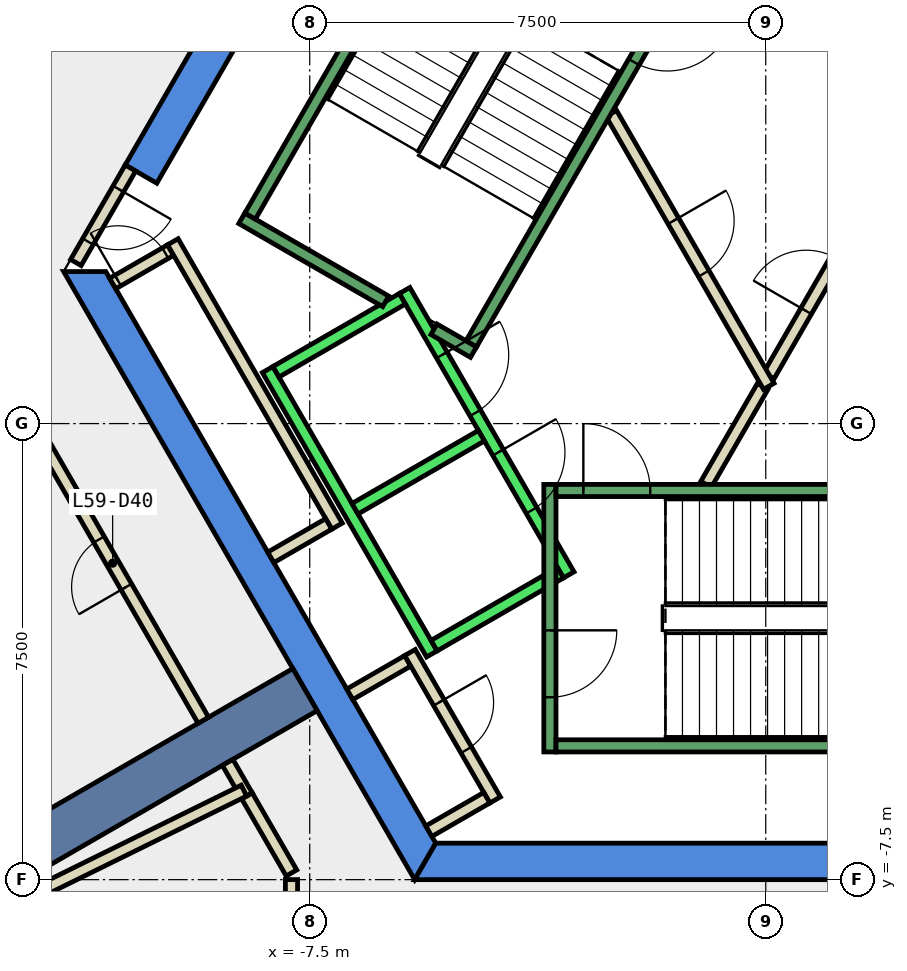
"""IFC4 building model, lengths in metres.
Left out: names, types, materials, properties, quantities, classifications, styles, units other than length and angle.
Written with IfcOpenShell. Run it as: python <this file> out.ifc"""

import sys

from ifc_helpers import new_model, si_unit, direction, frame, frame_2d, origin, place, context, subcontext, project, spatial, polyline, rectangle, outline, extrude, element, fill, save


model = new_model("IFC4")
c1 = context("Model", 3, precision=1e-05, world=origin(), true_north=direction((0.0, 1.0)))
c2 = subcontext(c1, "Body", "Model", "MODEL_VIEW")
j1 = project(units=[si_unit("LENGTHUNIT", "METRE"), si_unit("PLANEANGLEUNIT", "RADIAN")], contexts=[c1])
p1 = place(None, origin())
s1 = spatial("IfcSite", under=j1, at=p1, CompositionType="ELEMENT")
p2 = place(p1, origin())
s2 = spatial("IfcBuilding", under=s1, at=p2, CompositionType="ELEMENT")
p3 = place(p2, frame((0.0, 0.0, 259.4)))
s3 = spatial("IfcBuildingStorey", under=s2, at=p3, CompositionType="ELEMENT", Elevation=259.4)
p4 = place(p3, frame((0.0, 0.0, -0.34)))
e1 = element("IfcWall", 1, at=p4, inside=s3, PredefinedType="SHEAR", context=c2, shape_type="SweptSolid", body=[
    extrude(outline(polyline([(-10.535, 4.253), (-10.015, 3.953), (-5.427, 11.9), (-5.774, 12.5), (-10.535, 4.253)])), origin(), (0.0, 0.0, 1.0), 3.6),
])
p5 = place(p3, frame((0.0, 0.0, -0.34)))
e2 = element("IfcWall", 2, at=p5, inside=s3, PredefinedType="SHEAR", context=c2, shape_type="SweptSolid", body=[
    extrude(outline(polyline([(-11.547, 2.5), (-5.774, -7.5), (-5.427, -6.9), (-10.854, 2.5), (-11.547, 2.5)])), origin(), (0.0, 0.0, 1.0), 3.6),
])
p6 = place(p3, frame((0.0, 0.0, -0.34)))
e3 = element("IfcWall", 3, at=p6, inside=s3, PredefinedType="SHEAR", context=c2, shape_type="SweptSolid", body=[
    extrude(outline(polyline([(3.75, -7.5), (3.75, -6.9), (-5.427, -6.9), (-5.774, -7.5), (3.75, -7.5)])), origin(), (0.0, 0.0, 1.0), 3.6),
])
p7 = place(p3, frame((-7.578, -4.375, -0.34), z_axis=(0.0, 0.0, 1.0), x_axis=(-0.866024315419, -0.5000018851, 0.0)))
e4 = element("IfcWall", 4, at=p7, inside=s3, PredefinedType="SHEAR", context=c2, shape_type="SweptSolid", body=[
    extrude(rectangle(XDim=9.0, YDim=0.8, at=frame_2d((4.5, 0.0))), origin(), (0.0, 0.0, 1.0), 3.6),
])
p8 = place(p3, frame((-8.532, -6.123, 0.0), z_axis=(0.0, 0.0, 1.0), x_axis=(-0.499977104415, 0.866038622153, 0.0)))
e5 = element("IfcWall", 5, at=p8, inside=s3, PredefinedType="PARTITIONING", context=c2, shape_type="SweptSolid", body=[
    extrude(rectangle(XDim=0.636, YDim=0.2, at=frame_2d((0.318, 0.0))), origin(), (0.0, 0.0, 1.0), 3.26),
])
p9 = place(p3, frame((-7.8, -7.39, 0.0), z_axis=(0.0, 0.0, 1.0), x_axis=(-0.500266477503, 0.865871498253, 0.0)))
e6 = element("IfcWall", 6, at=p9, inside=s3, PredefinedType="PARTITIONING", context=c2, shape_type="SweptSolid", body=[
    extrude(rectangle(XDim=1.463, YDim=0.2, at=frame_2d((0.731, 0.0))), origin(), (0.0, 0.0, 1.0), 3.26),
])
p10 = place(p3, frame((-13.652, 4.224, 0.0), z_axis=(0.0, 0.0, 1.0), x_axis=(0.500221427001, 0.865897525097, 0.0)))
e7 = element("IfcWall", 7, at=p10, inside=s3, PredefinedType="PARTITIONING", context=c2, shape_type="SweptSolid", body=[
    extrude(rectangle(XDim=3.91, YDim=0.2, at=frame_2d((1.955, 0.0))), origin(), (0.0, 0.0, 1.0), 3.26),
])
p11 = place(p10, frame((1.505, 0.0, 0.0)))
e8 = element("IfcOpeningElement", 8, at=p11, cuts=e7, PredefinedType="OPENING", context=c2, shape_type="SweptSolid", body=[
    extrude(rectangle(XDim=1.0, YDim=2.1, at=frame_2d((0.5, 1.05))), frame((0.0, 0.11, 0.0), z_axis=(0.0, -1.0, 0.0), x_axis=(1.0, 0.0, 0.0)), (0.0, 0.0, 1.0), 0.22),
])
p12 = place(p3, frame((-10.741, 2.303, 0.0), z_axis=(0.0, 0.0, 1.0), x_axis=(0.866063652425, 0.499933745558, 0.0)))
e9 = element("IfcWall", 9, at=p12, inside=s3, PredefinedType="PARTITIONING", context=c2, shape_type="SweptSolid", body=[
    extrude(rectangle(XDim=1.1, YDim=0.2, at=frame_2d((0.55, 0.0))), origin(), (0.0, 0.0, 1.0), 3.26),
])
p13 = place(p12, frame((0.1, 0.0, 0.0)))
e10 = element("IfcOpeningElement", 10, at=p13, cuts=e9, PredefinedType="OPENING", context=c2, shape_type="SweptSolid", body=[
    extrude(rectangle(XDim=0.9, YDim=2.1, at=frame_2d((0.45, 1.05))), frame((0.0, 0.11, 0.0), z_axis=(0.0, -1.0, 0.0), x_axis=(1.0, 0.0, 0.0)), (0.0, 0.0, 1.0), 0.22),
])
p14 = place(p3, frame((-9.751, 2.99, 0.0), z_axis=(0.0, 0.0, 1.0), x_axis=(0.499955951776, -0.866050833545, 0.0)))
e11 = element("IfcWall", 11, at=p14, inside=s3, PredefinedType="PARTITIONING", context=c2, shape_type="SweptSolid", body=[
    extrude(rectangle(XDim=5.4, YDim=0.2, at=frame_2d((2.7, 0.0))), origin(), (0.0, 0.0, 1.0), 3.26),
])
p15 = place(p3, frame((-7.188, -1.65, 0.0), z_axis=(0.0, 0.0, 1.0), x_axis=(-0.865841558281, -0.500318294642, 0.0)))
e12 = element("IfcWall", 12, at=p15, inside=s3, PredefinedType="PARTITIONING", context=c2, shape_type="SweptSolid", body=[
    extrude(rectangle(XDim=1.099, YDim=0.2, at=frame_2d((0.55, 0.0))), origin(), (0.0, 0.0, 1.0), 3.26),
])
p16 = place(p3, frame((-6.841, -4.452, 0.0), z_axis=(0.0, 0.0, 1.0), x_axis=(0.86621513555, 0.499671230855, 0.0)))
e13 = element("IfcWall", 13, at=p16, inside=s3, PredefinedType="PARTITIONING", context=c2, shape_type="SweptSolid", body=[
    extrude(rectangle(XDim=1.1, YDim=0.2, at=frame_2d((0.55, 0.0))), origin(), (0.0, 0.0, 1.0), 3.26),
])
p17 = place(p3, frame((-5.851, -3.765, 0.0), z_axis=(0.0, 0.0, 1.0), x_axis=(0.500011755427, -0.866018616679, 0.0)))
e14 = element("IfcWall", 14, at=p17, inside=s3, PredefinedType="PARTITIONING", context=c2, shape_type="SweptSolid", body=[
    extrude(rectangle(XDim=2.8, YDim=0.2, at=frame_2d((1.4, 0.0))), origin(), (0.0, 0.0, 1.0), 3.26),
])
p18 = place(p17, frame((0.95, 0.0, 0.0)))
e15 = element("IfcOpeningElement", 15, at=p18, cuts=e14, PredefinedType="OPENING", context=c2, shape_type="SweptSolid", body=[
    extrude(rectangle(XDim=0.9, YDim=2.1, at=frame_2d((0.45, 1.05))), frame((0.0, 0.11, 0.0), z_axis=(0.0, -1.0, 0.0), x_axis=(1.0, 0.0, 0.0)), (0.0, 0.0, 1.0), 0.22),
])
p19 = place(p3, frame((-4.588, -6.153, 0.0), z_axis=(0.0, 0.0, 1.0), x_axis=(-0.86621513555, -0.499671230855, 0.0)))
e16 = element("IfcWall", 16, at=p19, inside=s3, PredefinedType="PARTITIONING", context=c2, shape_type="SweptSolid", body=[
    extrude(rectangle(XDim=1.1, YDim=0.2, at=frame_2d((0.55, 0.0))), origin(), (0.0, 0.0, 1.0), 3.26),
])
p20 = place(p3, frame((-0.982, -1.0, 0.0), z_axis=(0.0, 0.0, 1.0), x_axis=(0.50024047865, 0.865886518847, 0.0)))
e17 = element("IfcWall", 17, at=p20, inside=s3, PredefinedType="PARTITIONING", context=c2, shape_type="SweptSolid", body=[
    extrude(rectangle(XDim=1.863, YDim=0.2, at=frame_2d((0.931, 0.0))), origin(), (0.0, 0.0, 1.0), 3.26),
])
p21 = place(p3, frame((0.05, 0.787, 0.0), z_axis=(0.0, 0.0, 1.0), x_axis=(0.499954076797, 0.866051915934, 0.0)))
e18 = element("IfcWall", 18, at=p21, inside=s3, PredefinedType="PARTITIONING", context=c2, shape_type="SweptSolid", body=[
    extrude(rectangle(XDim=3.558, YDim=0.2, at=frame_2d((1.779, 0.0))), origin(), (0.0, 0.0, 1.0), 3.26),
])
p22 = place(p21, frame((1.229, 0.0, 0.0)))
e19 = element("IfcOpeningElement", 19, at=p22, cuts=e18, PredefinedType="OPENING", context=c2, shape_type="SweptSolid", body=[
    extrude(rectangle(XDim=1.0, YDim=2.1, at=frame_2d((0.5, 1.05))), frame((0.0, 0.11, 0.0), z_axis=(0.0, -1.0, 0.0), x_axis=(1.0, 0.0, 0.0)), (0.0, 0.0, 1.0), 0.22),
])
p23 = place(p3, frame((-2.54, 5.1, 0.0), z_axis=(0.0, 0.0, 1.0), x_axis=(0.499925051871, -0.866068670783, 0.0)))
e20 = element("IfcWall", 20, at=p23, inside=s3, PredefinedType="PARTITIONING", context=c2, shape_type="SweptSolid", body=[
    extrude(rectangle(XDim=5.181, YDim=0.2, at=frame_2d((2.59, 0.0))), origin(), (0.0, 0.0, 1.0), 3.26),
])
p24 = place(p23, frame((2.04, 0.0, 0.0)))
e21 = element("IfcOpeningElement", 21, at=p24, cuts=e20, PredefinedType="OPENING", context=c2, shape_type="SweptSolid", body=[
    extrude(rectangle(XDim=1.0, YDim=2.1, at=frame_2d((0.5, 1.05))), frame((0.0, 0.11, 0.0), z_axis=(0.0, -1.0, 0.0), x_axis=(1.0, 0.0, 0.0)), (0.0, 0.0, 1.0), 0.22),
])
p25 = place(p3, frame((-7.8, -12.184, 0.0), z_axis=(0.0, 0.0, 1.0), x_axis=(0.0, 1.0, 0.0)))
e22 = element("IfcWall", 22, at=p25, inside=s3, PredefinedType="PARTITIONING", context=c2, shape_type="SweptSolid", body=[
    extrude(rectangle(XDim=4.685, YDim=0.2, at=frame_2d((2.343, 0.0))), origin(), (0.0, 0.0, 1.0), 3.26),
])
p26 = place(p3, frame((-8.582, -6.036, 0.0), z_axis=(0.0, 0.0, 1.0), x_axis=(-0.897105141673, -0.441817116897, 0.0)))
e23 = element("IfcWall", 23, at=p26, inside=s3, PredefinedType="PARTITIONING", context=c2, shape_type="SweptSolid", body=[
    extrude(rectangle(XDim=5.111, YDim=0.2, at=frame_2d((2.555, 0.0))), origin(), (0.0, 0.0, 1.0), 3.26),
])
p27 = place(p3, frame((-10.449, 4.203, 0.0), z_axis=(0.0, 0.0, 1.0), x_axis=(-0.499914839587, -0.866074565589, 0.0)))
e24 = element("IfcWall", 24, at=p27, inside=s3, PredefinedType="PARTITIONING", context=c2, shape_type="SweptSolid", body=[
    extrude(rectangle(XDim=1.794, YDim=0.2, at=frame_2d((0.897, 0.0))), origin(), (0.0, 0.0, 1.0), 2.4),
])
p28 = place(p27, frame((0.397, 0.0, 0.0)))
e25 = element("IfcOpeningElement", 25, at=p28, cuts=e24, PredefinedType="OPENING", context=c2, shape_type="SweptSolid", body=[
    extrude(rectangle(XDim=1.0, YDim=2.1, at=frame_2d((0.5, 1.05))), frame((0.0, 0.11, 0.0), z_axis=(0.0, -1.0, 0.0), x_axis=(1.0, 0.0, 0.0)), (0.0, 0.0, 1.0), 0.22),
])
p29 = place(p3, frame((-9.25, -4.879, 0.0), z_axis=(0.0, 0.0, 1.0), x_axis=(-0.499944124422, 0.866057661161, 0.0)))
e26 = element("IfcWall", 26, at=p29, inside=s3, PredefinedType="PARTITIONING", context=c2, shape_type="SweptSolid", body=[
    extrude(rectangle(XDim=7.405, YDim=0.2, at=frame_2d((3.702, 0.0))), origin(), (0.0, 0.0, 1.0), 3.26),
])
p30 = place(p29, frame((2.533, 0.0, 0.0)))
e27 = element("IfcOpeningElement", 27, at=p30, cuts=e26, PredefinedType="OPENING", context=c2, shape_type="SweptSolid", body=[
    extrude(rectangle(XDim=0.9, YDim=2.1, at=frame_2d((0.45, 1.05))), frame((0.0, 0.11, 0.0), z_axis=(0.0, -1.0, 0.0), x_axis=(1.0, 0.0, 0.0)), (0.0, 0.0, 1.0), 0.22),
])
p31 = place(p3, frame((-5.94, 2.188, 0.0), z_axis=(0.0, 0.0, 1.0), x_axis=(0.500034260056, -0.866005622828, 0.0)))
e28 = element("IfcWall", 28, at=p31, inside=s3, PredefinedType="STANDARD", context=c2, shape_type="SweptSolid", body=[
    extrude(rectangle(XDim=5.399, YDim=0.2, at=frame_2d((2.7, 0.0))), origin(), (0.0, 0.0, 1.0), 3.26),
])
p32 = place(p31, frame((3.075, 0.0, 0.0)))
e29 = element("IfcOpeningElement", 29, at=p32, cuts=e28, PredefinedType="OPENING", context=c2, shape_type="SweptSolid", body=[
    extrude(rectangle(XDim=1.1, YDim=2.1, at=frame_2d((0.55, 1.05))), frame((0.0, 0.11, 0.0), z_axis=(0.0, -1.0, 0.0), x_axis=(1.0, 0.0, 0.0)), (0.0, 0.0, 1.0), 0.22),
])
p33 = place(p31, frame((1.225, 0.0, 0.0)))
e30 = element("IfcOpeningElement", 30, at=p33, cuts=e28, PredefinedType="OPENING", context=c2, shape_type="SweptSolid", body=[
    extrude(rectangle(XDim=1.1, YDim=2.1, at=frame_2d((0.55, 1.05))), frame((0.0, 0.11, 0.0), z_axis=(0.0, -1.0, 0.0), x_axis=(1.0, 0.0, 0.0)), (0.0, 0.0, 1.0), 0.22),
])
p34 = place(p3, frame((-8.192, 0.888, 0.0), z_axis=(0.0, 0.0, 1.0), x_axis=(0.500034260056, -0.866005622828, 0.0)))
e31 = element("IfcWall", 31, at=p34, inside=s3, PredefinedType="STANDARD", context=c2, shape_type="SweptSolid", body=[
    extrude(rectangle(XDim=5.399, YDim=0.2, at=frame_2d((2.7, 0.0))), origin(), (0.0, 0.0, 1.0), 3.26),
])
for number, where, z_axis, x_axis in (
    (32, (-5.977, 2.052, 0.0), (0.0, 0.0, 1.0), (-0.866, -0.5, 0.0)),
    (33, (-4.677, -0.2, 0.0), (0.0, 0.0, 1.0), (-0.866, -0.5, 0.0)),
):
    element("IfcWall", number, at=place(p3, frame(where, z_axis=z_axis, x_axis=x_axis)), inside=s3, PredefinedType="STANDARD", context=c2, shape_type="SweptSolid", body=[
        extrude(rectangle(XDim=2.399, YDim=0.2, at=frame_2d((1.2, 0.0))), origin(), (0.0, 0.0, 1.0), 3.26),
    ])
p35 = place(p3, frame((-3.377, -2.452, 0.0), z_axis=(0.0, 0.0, 1.0), x_axis=(-0.865955154139, -0.50012165622, 0.0)))
e34 = element("IfcWall", 34, at=p35, inside=s3, PredefinedType="STANDARD", context=c2, shape_type="SweptSolid", body=[
    extrude(rectangle(XDim=2.4, YDim=0.2, at=frame_2d((1.2, 0.0))), origin(), (0.0, 0.0, 1.0), 3.26),
])
p36 = place(p3, frame((-3.55, -1.0, 0.0), z_axis=(0.0, 0.0, 1.0), x_axis=(0.0, -1.0, 0.0)))
e35 = element("IfcWall", 35, at=p36, inside=s3, PredefinedType="STANDARD", context=c2, shape_type="SweptSolid", body=[
    extrude(rectangle(XDim=4.4, YDim=0.2, at=frame_2d((2.2, 0.0))), origin(), (0.0, 0.0, 1.0), 3.26),
])
p37 = place(p36, frame((2.4, 0.0, 0.0)))
e36 = element("IfcOpeningElement", 36, at=p37, cuts=e35, PredefinedType="OPENING", context=c2, shape_type="SweptSolid", body=[
    extrude(rectangle(XDim=1.1, YDim=2.2, at=frame_2d((0.55, 1.1))), frame((0.0, 0.11, 0.0), z_axis=(0.0, -1.0, 0.0), x_axis=(1.0, 0.0, 0.0)), (0.0, 0.0, 1.0), 0.22),
])
p38 = place(p3, frame((-3.45, -1.1, 0.0), z_axis=(0.0, 0.0, 1.0), x_axis=(1.0, 0.0, 0.0)))
e37 = element("IfcWall", 37, at=p38, inside=s3, PredefinedType="STANDARD", context=c2, shape_type="SweptSolid", body=[
    extrude(rectangle(XDim=6.9, YDim=0.2, at=frame_2d((3.45, 0.0))), origin(), (0.0, 0.0, 1.0), 3.26),
])
p39 = place(p38, frame((0.45, 0.0, 0.0)))
e38 = element("IfcOpeningElement", 38, at=p39, cuts=e37, PredefinedType="OPENING", context=c2, shape_type="SweptSolid", body=[
    extrude(rectangle(XDim=1.1, YDim=2.2, at=frame_2d((0.55, 1.1))), frame((0.0, 0.11, 0.0), z_axis=(0.0, -1.0, 0.0), x_axis=(1.0, 0.0, 0.0)), (0.0, 0.0, 1.0), 0.22),
])
p40 = place(p3, frame((-3.45, -5.3, 0.0), z_axis=(0.0, 0.0, 1.0), x_axis=(1.0, 0.0, 0.0)))
e39 = element("IfcWall", 39, at=p40, inside=s3, PredefinedType="STANDARD", context=c2, shape_type="SweptSolid", body=[
    extrude(rectangle(XDim=6.9, YDim=0.2, at=frame_2d((3.45, 0.0))), origin(), (0.0, 0.0, 1.0), 3.26),
])
p41 = place(p3, frame((-6.25, 2.01, 0.0), z_axis=(0.0, 0.0, 1.0), x_axis=(-0.86611865017, 0.499838457731, 0.0)))
e40 = element("IfcWall", 40, at=p41, inside=s3, PredefinedType="STANDARD", context=c2, shape_type="SweptSolid", body=[
    extrude(rectangle(XDim=2.733, YDim=0.2, at=frame_2d((1.366, 0.0))), origin(), (0.0, 0.0, 1.0), 3.26),
])
p42 = place(p3, frame((-4.806, 1.176, 0.0), z_axis=(0.0, 0.0, 1.0), x_axis=(-0.866558586415, 0.499075361355, 0.0)))
e41 = element("IfcWall", 41, at=p42, inside=s3, PredefinedType="STANDARD", context=c2, shape_type="SweptSolid", body=[
    extrude(rectangle(XDim=0.751, YDim=0.2, at=frame_2d((0.376, 0.0))), origin(), (0.0, 0.0, 1.0), 3.26),
])
p43 = place(p3, frame((-1.393, 7.288, 0.0), z_axis=(0.0, 0.0, 1.0), x_axis=(-0.499963383562, -0.866046543262, 0.0)))
e42 = element("IfcWall", 42, at=p43, inside=s3, PredefinedType="STANDARD", context=c2, shape_type="SweptSolid", body=[
    extrude(rectangle(XDim=6.9, YDim=0.2, at=frame_2d((3.45, 0.0))), origin(), (0.0, 0.0, 1.0), 3.26),
])
p44 = place(p43, frame((0.45, 0.0, 0.0)))
e43 = element("IfcOpeningElement", 43, at=p44, cuts=e42, PredefinedType="OPENING", context=c2, shape_type="SweptSolid", body=[
    extrude(rectangle(XDim=1.1, YDim=2.2, at=frame_2d((0.55, 1.1))), frame((0.0, 0.11, 0.0), z_axis=(0.0, -1.0, 0.0), x_axis=(1.0, 0.0, 0.0)), (0.0, 0.0, 1.0), 0.22),
])
p45 = place(p3, frame((-5.03, 9.388, 0.0), z_axis=(0.0, 0.0, 1.0), x_axis=(-0.499978703459, -0.866037698999, 0.0)))
e44 = element("IfcWall", 44, at=p45, inside=s3, PredefinedType="STANDARD", context=c2, shape_type="SweptSolid", body=[
    extrude(rectangle(XDim=6.9, YDim=0.2, at=frame_2d((3.45, 0.0))), origin(), (0.0, 0.0, 1.0), 3.26),
])
p46 = place(p30, origin())
e45 = element("IfcDoor", 45, at=p46, inside=s3, OperationType="SINGLE_SWING_RIGHT", PredefinedType="DOOR", context=c2, shape_type="SweptSolid", body=[
    extrude(rectangle(XDim=0.9, YDim=2.1, at=frame_2d((0.45, 1.05))), frame((0.0, 0.025, 0.0), z_axis=(0.0, -1.0, 0.0), x_axis=(1.0, 0.0, 0.0)), (0.0, 0.0, 1.0), 0.05),
])
fill(e27, e45)
p47 = place(p22, origin())
e46 = element("IfcDoor", 46, at=p47, inside=s3, OperationType="SINGLE_SWING_RIGHT", PredefinedType="DOOR", context=c2, shape_type="SweptSolid", body=[
    extrude(rectangle(XDim=1.0, YDim=2.1, at=frame_2d((0.5, 1.05))), frame((0.0, 0.025, 0.0), z_axis=(0.0, -1.0, 0.0), x_axis=(1.0, 0.0, 0.0)), (0.0, 0.0, 1.0), 0.05),
])
fill(e19, e46)
p48 = place(p24, origin())
e47 = element("IfcDoor", 47, at=p48, inside=s3, OperationType="SINGLE_SWING_RIGHT", PredefinedType="DOOR", context=c2, shape_type="SweptSolid", body=[
    extrude(rectangle(XDim=1.0, YDim=2.1, at=frame_2d((0.5, 1.05))), frame((0.0, 0.025, 0.0), z_axis=(0.0, -1.0, 0.0), x_axis=(1.0, 0.0, 0.0)), (0.0, 0.0, 1.0), 0.05),
])
fill(e21, e47)
p49 = place(p13, origin())
e48 = element("IfcDoor", 48, at=p49, inside=s3, OperationType="SINGLE_SWING_RIGHT", PredefinedType="DOOR", context=c2, shape_type="SweptSolid", body=[
    extrude(rectangle(XDim=0.9, YDim=2.1, at=frame_2d((0.45, 1.05))), frame((0.0, 0.025, 0.0), z_axis=(0.0, -1.0, 0.0), x_axis=(1.0, 0.0, 0.0)), (0.0, 0.0, 1.0), 0.05),
])
fill(e10, e48)
p50 = place(p18, origin())
e49 = element("IfcDoor", 49, at=p50, inside=s3, OperationType="SINGLE_SWING_RIGHT", PredefinedType="DOOR", context=c2, shape_type="SweptSolid", body=[
    extrude(rectangle(XDim=0.9, YDim=2.1, at=frame_2d((0.45, 1.05))), frame((0.0, 0.025, 0.0), z_axis=(0.0, -1.0, 0.0), x_axis=(1.0, 0.0, 0.0)), (0.0, 0.0, 1.0), 0.05),
])
fill(e15, e49)
p51 = place(p28, origin())
e50 = element("IfcDoor", 50, at=p51, inside=s3, OperationType="SINGLE_SWING_LEFT", PredefinedType="DOOR", context=c2, shape_type="SweptSolid", body=[
    extrude(rectangle(XDim=1.0, YDim=2.1, at=frame_2d((0.5, 1.05))), frame((0.0, 0.025, 0.0), z_axis=(0.0, -1.0, 0.0), x_axis=(1.0, 0.0, 0.0)), (0.0, 0.0, 1.0), 0.05),
])
fill(e25, e50)
p52 = place(p32, origin())
e51 = element("IfcDoor", 51, at=p52, inside=s3, OperationType="SLIDING_TO_LEFT", PredefinedType="DOOR", context=c2, shape_type="SweptSolid", body=[
    extrude(rectangle(XDim=1.1, YDim=2.1, at=frame_2d((0.55, 1.05))), frame((0.0, 0.025, 0.0), z_axis=(0.0, -1.0, 0.0), x_axis=(1.0, 0.0, 0.0)), (0.0, 0.0, 1.0), 0.05),
])
fill(e29, e51)
p53 = place(p33, origin())
e52 = element("IfcDoor", 52, at=p53, inside=s3, OperationType="SLIDING_TO_LEFT", PredefinedType="DOOR", context=c2, shape_type="SweptSolid", body=[
    extrude(rectangle(XDim=1.1, YDim=2.1, at=frame_2d((0.55, 1.05))), frame((0.0, 0.025, 0.0), z_axis=(0.0, -1.0, 0.0), x_axis=(1.0, 0.0, 0.0)), (0.0, 0.0, 1.0), 0.05),
])
fill(e30, e52)
p54 = place(p39, origin())
e53 = element("IfcDoor", 53, at=p54, inside=s3, OperationType="SINGLE_SWING_LEFT", PredefinedType="DOOR", context=c2, shape_type="SweptSolid", body=[
    extrude(rectangle(XDim=1.1, YDim=2.2, at=frame_2d((0.55, 1.1))), frame((0.0, 0.025, 0.0), z_axis=(0.0, -1.0, 0.0), x_axis=(1.0, 0.0, 0.0)), (0.0, 0.0, 1.0), 0.05),
])
fill(e38, e53)
p55 = place(p37, origin())
e54 = element("IfcDoor", 54, at=p55, inside=s3, OperationType="SINGLE_SWING_LEFT", PredefinedType="DOOR", context=c2, shape_type="SweptSolid", body=[
    extrude(rectangle(XDim=1.1, YDim=2.2, at=frame_2d((0.55, 1.1))), frame((0.0, 0.025, 0.0), z_axis=(0.0, -1.0, 0.0), x_axis=(1.0, 0.0, 0.0)), (0.0, 0.0, 1.0), 0.05),
])
fill(e36, e54)
p56 = place(p44, origin())
e55 = element("IfcDoor", 55, at=p56, inside=s3, OperationType="SINGLE_SWING_LEFT", PredefinedType="DOOR", context=c2, shape_type="SweptSolid", body=[
    extrude(rectangle(XDim=1.1, YDim=2.2, at=frame_2d((0.55, 1.1))), frame((0.0, 0.025, 0.0), z_axis=(0.0, -1.0, 0.0), x_axis=(1.0, 0.0, 0.0)), (0.0, 0.0, 1.0), 0.05),
])
fill(e43, e55)
save(model, sys.argv[1])
